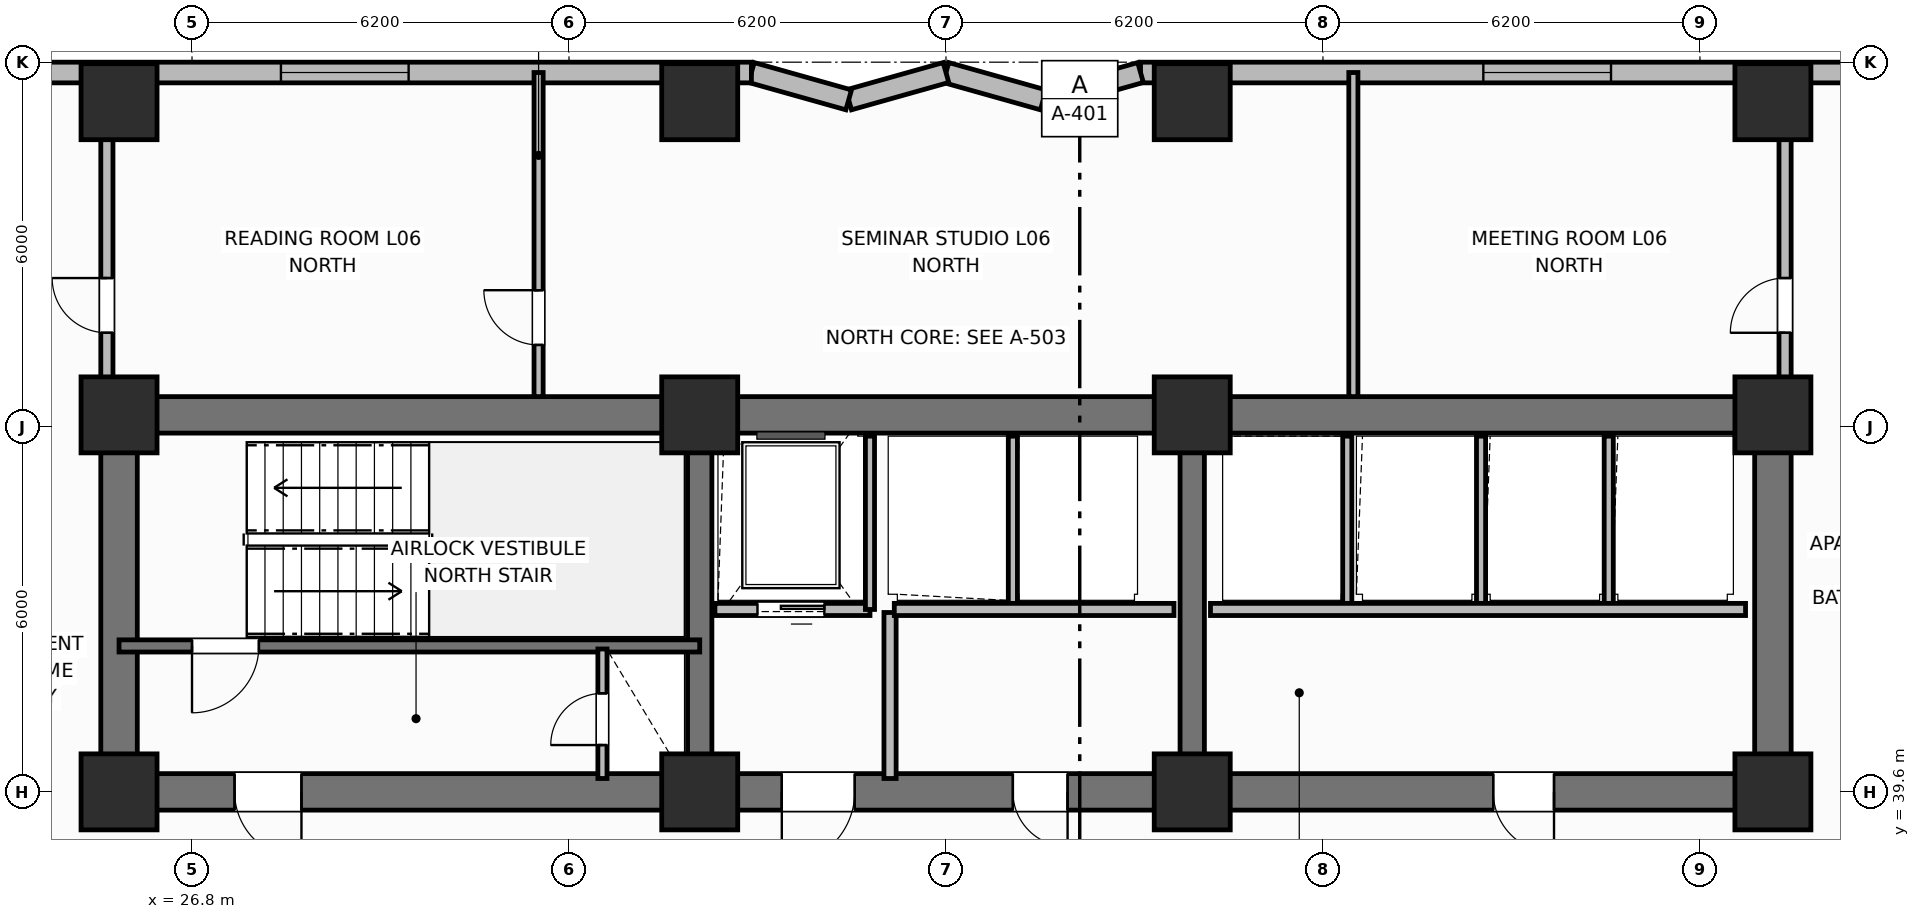
"""IFC4 building model, lengths in metres.
Left out: names, types, materials, properties, quantities, classifications, styles, units other than length and angle.
Written with IfcOpenShell. Run it as: python <this file> out.ifc"""

import sys

from ifc_helpers import new_model, si_unit, direction, frame, frame_2d, origin, origin_2d, place, context, subcontext, project, spatial, rectangle, extrude, element, fill, save


model = new_model("IFC4")
c1 = context("Model", 3, precision=1e-05, world=origin(), true_north=direction((0.0, 1.0)))
c2 = subcontext(c1, "Body", "Model", "MODEL_VIEW")
j1 = project(units=[si_unit("LENGTHUNIT", "METRE"), si_unit("PLANEANGLEUNIT", "RADIAN")], contexts=[c1])
p1 = place(None, origin())
s1 = spatial("IfcSite", under=j1, at=p1, CompositionType="ELEMENT")
p2 = place(p1, origin())
s2 = spatial("IfcBuilding", under=s1, at=p2, CompositionType="ELEMENT")
p3 = place(p2, frame((0.0, 0.0, 28.8)))
s3 = spatial("IfcBuildingStorey", under=s2, at=p3, CompositionType="ELEMENT", Elevation=28.8)
p4 = place(p3, frame((25.6, 45.8, 0.0), z_axis=(0.0, 0.0, 1.0), x_axis=(1.0, 0.0, 0.0)))
e1 = element("IfcWall", 1, at=p4, inside=s3, PredefinedType="SHEAR", context=c2, shape_type="SweptSolid", body=[
    extrude(rectangle(XDim=27.2, YDim=0.6, at=frame_2d((13.6, 0.0))), origin(), (0.0, 0.0, 1.0), 3.7),
])
for number, where, z_axis, x_axis in (
    (2, (25.6, 39.9, 0.0), (0.0, 0.0, 1.0), (0.0, 1.0, 0.0)),
    (3, (52.8, 39.9, 0.0), (0.0, 0.0, 1.0), (0.0, 1.0, 0.0)),
):
    element("IfcWall", number, at=place(p3, frame(where, z_axis=z_axis, x_axis=x_axis)), inside=s3, PredefinedType="SHEAR", context=c2, shape_type="SweptSolid", body=[
        extrude(rectangle(XDim=5.6, YDim=0.6, at=frame_2d((2.8, 0.0))), origin(), (0.0, 0.0, 1.0), 3.7),
    ])
p5 = place(p3, frame((52.8, 39.6, 0.0), z_axis=(0.0, 0.0, 1.0), x_axis=(-1.0, 0.0, 0.0)))
e4 = element("IfcWall", 4, at=p5, inside=s3, PredefinedType="SHEAR", context=c2, shape_type="SweptSolid", body=[
    extrude(rectangle(XDim=27.2, YDim=0.6, at=frame_2d((13.6, 0.0))), origin(), (0.0, 0.0, 1.0), 3.7),
])
p6 = place(p5, frame((24.2, 0.0, 0.0)))
e5 = element("IfcOpeningElement", 5, at=p6, cuts=e4, PredefinedType="OPENING", context=c2, shape_type="SweptSolid", body=[
    extrude(rectangle(XDim=1.1, YDim=2.15, at=frame_2d((0.55, 1.075))), frame((0.0, 0.31, 0.0), z_axis=(0.0, -1.0, 0.0), x_axis=(1.0, 0.0, 0.0)), (0.0, 0.0, 1.0), 0.62),
])
p7 = place(p5, frame((15.1, 0.0, 0.0)))
e6 = element("IfcOpeningElement", 6, at=p7, cuts=e4, PredefinedType="OPENING", context=c2, shape_type="SweptSolid", body=[
    extrude(rectangle(XDim=1.2, YDim=2.15, at=frame_2d((0.6, 1.075))), frame((0.0, 0.31, 0.0), z_axis=(0.0, -1.0, 0.0), x_axis=(1.0, 0.0, 0.0)), (0.0, 0.0, 1.0), 0.62),
])
p8 = place(p5, frame((11.6, 0.0, 0.0)))
e7 = element("IfcOpeningElement", 7, at=p8, cuts=e4, PredefinedType="OPENING", context=c2, shape_type="SweptSolid", body=[
    extrude(rectangle(XDim=0.9, YDim=2.1, at=frame_2d((0.45, 1.05))), frame((0.0, 0.31, 0.0), z_axis=(0.0, -1.0, 0.0), x_axis=(1.0, 0.0, 0.0)), (0.0, 0.0, 1.0), 0.62),
])
p9 = place(p5, frame((3.6, 0.0, 0.0)))
e8 = element("IfcOpeningElement", 8, at=p9, cuts=e4, PredefinedType="OPENING", context=c2, shape_type="SweptSolid", body=[
    extrude(rectangle(XDim=1.0, YDim=2.15, at=frame_2d((0.5, 1.075))), frame((0.0, 0.31, 0.0), z_axis=(0.0, -1.0, 0.0), x_axis=(1.0, 0.0, 0.0)), (0.0, 0.0, 1.0), 0.62),
])
for number, where, z_axis, x_axis in (
    (9, (35.15, 39.9, 0.0), (0.0, 0.0, 1.0), (0.0, 1.0, 0.0)),
    (10, (43.25, 39.9, 0.0), (0.0, 0.0, 1.0), (0.0, 1.0, 0.0)),
):
    element("IfcWall", number, at=place(p3, frame(where, z_axis=z_axis, x_axis=x_axis)), inside=s3, PredefinedType="SHEAR", context=c2, shape_type="SweptSolid", body=[
        extrude(rectangle(XDim=5.6, YDim=0.4, at=frame_2d((2.8, 0.0))), origin(), (0.0, 0.0, 1.0), 3.7),
    ])
for number, where, z_axis, x_axis in (
    (11, (25.6, 39.6, 0.0), (0.0, 0.0, 1.0), (1.0, 0.0, 0.0)),
    (12, (25.6, 45.8, 0.0), (0.0, 0.0, 1.0), (1.0, 0.0, 0.0)),
    (13, (35.15, 39.6, 0.0), (0.0, 0.0, 1.0), (1.0, 0.0, 0.0)),
    (14, (35.15, 45.8, 0.0), (0.0, 0.0, 1.0), (1.0, 0.0, 0.0)),
    (15, (43.25, 39.6, 0.0), (0.0, 0.0, 1.0), (1.0, 0.0, 0.0)),
    (16, (43.25, 45.8, 0.0), (0.0, 0.0, 1.0), (1.0, 0.0, 0.0)),
    (17, (52.8, 39.6, 0.0), (0.0, 0.0, 1.0), (1.0, 0.0, 0.0)),
    (18, (52.8, 45.8, 0.0), (0.0, 0.0, 1.0), (1.0, 0.0, 0.0)),
    (19, (25.6, 50.95, 0.0), (0.0, 0.0, 1.0), (1.0, 0.0, 0.0)),
    (20, (35.15, 50.95, 0.0), (0.0, 0.0, 1.0), (1.0, 0.0, 0.0)),
    (21, (43.25, 50.95, 0.0), (0.0, 0.0, 1.0), (1.0, 0.0, 0.0)),
    (22, (52.8, 50.95, 0.0), (0.0, 0.0, 1.0), (1.0, 0.0, 0.0)),
):
    element("IfcColumn", number, at=place(p3, frame(where, z_axis=z_axis, x_axis=x_axis)), inside=s3, PredefinedType="COLUMN", context=c2, shape_type="SweptSolid", body=[
        extrude(rectangle(XDim=1.25, YDim=1.25, at=origin_2d()), origin(), (0.0, 0.0, 1.0), 3.7),
    ])
p10 = place(p3, frame((59.8, 51.43, 0.0), z_axis=(0.0, 0.0, 1.0), x_axis=(-1.0, 0.0, 0.0)))
e23 = element("IfcWall", 23, at=p10, inside=s3, PredefinedType="SOLIDWALL", context=c2, shape_type="SweptSolid", body=[
    extrude(rectangle(XDim=17.4, YDim=0.34, at=frame_2d((8.7, 0.0))), origin(), (0.0, 0.0, 1.0), 2.7),
])
p11 = place(p10, frame((1.262, 0.0, 0.68)))
e24 = element("IfcOpeningElement", 24, at=p11, cuts=e23, PredefinedType="OPENING", context=c2, shape_type="SweptSolid", body=[
    extrude(rectangle(XDim=2.1, YDim=1.9, at=frame_2d((1.05, 0.95))), frame((0.0, 0.18, 0.0), z_axis=(0.0, -1.0, 0.0), x_axis=(1.0, 0.0, 0.0)), (0.0, 0.0, 1.0), 0.36),
])
p12 = place(p10, frame((9.663, 0.0, 0.68)))
e25 = element("IfcOpeningElement", 25, at=p12, cuts=e23, PredefinedType="OPENING", context=c2, shape_type="SweptSolid", body=[
    extrude(rectangle(XDim=2.1, YDim=1.9, at=frame_2d((1.05, 0.95))), frame((0.0, 0.18, 0.0), z_axis=(0.0, -1.0, 0.0), x_axis=(1.0, 0.0, 0.0)), (0.0, 0.0, 1.0), 0.36),
])
p13 = place(p3, frame((42.4, 51.43, 0.0), z_axis=(0.0, 0.0, 1.0), x_axis=(-0.962652136636, -0.270741322725, 0.0)))
e26 = element("IfcWall", 26, at=p13, inside=s3, PredefinedType="SOLIDWALL", context=c2, shape_type="SweptSolid", body=[
    extrude(rectangle(XDim=1.662, YDim=0.34, at=frame_2d((0.831, 0.0))), origin(), (0.0, 0.0, 1.0), 2.7),
])
p14 = place(p3, frame((40.8, 50.98, 0.0), z_axis=(0.0, 0.0, 1.0), x_axis=(-0.962662902433, 0.270703040766, 0.0)))
e27 = element("IfcWall", 27, at=p14, inside=s3, PredefinedType="SOLIDWALL", context=c2, shape_type="SweptSolid", body=[
    extrude(rectangle(XDim=1.662, YDim=0.34, at=frame_2d((0.831, 0.0))), origin(), (0.0, 0.0, 1.0), 2.7),
])
p15 = place(p3, frame((39.2, 51.43, 0.0), z_axis=(0.0, 0.0, 1.0), x_axis=(-0.962652136636, -0.270741322725, 0.0)))
e28 = element("IfcWall", 28, at=p15, inside=s3, PredefinedType="SOLIDWALL", context=c2, shape_type="SweptSolid", body=[
    extrude(rectangle(XDim=1.662, YDim=0.34, at=frame_2d((0.831, 0.0))), origin(), (0.0, 0.0, 1.0), 2.7),
])
p16 = place(p3, frame((37.6, 50.98, 0.0), z_axis=(0.0, 0.0, 1.0), x_axis=(-0.962662902433, 0.270703040766, 0.0)))
e29 = element("IfcWall", 29, at=p16, inside=s3, PredefinedType="SOLIDWALL", context=c2, shape_type="SweptSolid", body=[
    extrude(rectangle(XDim=1.662, YDim=0.34, at=frame_2d((0.831, 0.0))), origin(), (0.0, 0.0, 1.0), 2.7),
])
p17 = place(p3, frame((36.0, 51.43, 0.0), z_axis=(0.0, 0.0, 1.0), x_axis=(-1.0, 0.0, 0.0)))
e30 = element("IfcWall", 30, at=p17, inside=s3, PredefinedType="SOLIDWALL", context=c2, shape_type="SweptSolid", body=[
    extrude(rectangle(XDim=17.4, YDim=0.34, at=frame_2d((8.7, 0.0))), origin(), (0.0, 0.0, 1.0), 2.7),
])
p18 = place(p17, frame((5.637, 0.0, 0.68)))
e31 = element("IfcOpeningElement", 31, at=p18, cuts=e30, PredefinedType="OPENING", context=c2, shape_type="SweptSolid", body=[
    extrude(rectangle(XDim=2.1, YDim=1.9, at=frame_2d((1.05, 0.95))), frame((0.0, 0.18, 0.0), z_axis=(0.0, -1.0, 0.0), x_axis=(1.0, 0.0, 0.0)), (0.0, 0.0, 1.0), 0.36),
])
p19 = place(p17, frame((14.038, 0.0, 0.68)))
e32 = element("IfcOpeningElement", 32, at=p19, cuts=e30, PredefinedType="OPENING", context=c2, shape_type="SweptSolid", body=[
    extrude(rectangle(XDim=2.1, YDim=1.9, at=frame_2d((1.05, 0.95))), frame((0.0, 0.18, 0.0), z_axis=(0.0, -1.0, 0.0), x_axis=(1.0, 0.0, 0.0)), (0.0, 0.0, 1.0), 0.36),
])
p20 = place(p3, frame((35.15, 42.0, 0.0), z_axis=(0.0, 0.0, 1.0), x_axis=(-1.0, 0.0, 0.0)))
e33 = element("IfcWall", 33, at=p20, inside=s3, PredefinedType="SHEAR", context=c2, shape_type="SweptSolid", body=[
    extrude(rectangle(XDim=9.55, YDim=0.2, at=frame_2d((4.775, 0.0))), origin(), (0.0, 0.0, 1.0), 3.7),
])
p21 = place(p20, frame((7.25, 0.0, 0.0)))
e34 = element("IfcOpeningElement", 34, at=p21, cuts=e33, PredefinedType="OPENING", context=c2, shape_type="SweptSolid", body=[
    extrude(rectangle(XDim=1.1, YDim=2.15, at=frame_2d((0.55, 1.075))), frame((0.0, 0.11, 0.0), z_axis=(0.0, -1.0, 0.0), x_axis=(1.0, 0.0, 0.0)), (0.0, 0.0, 1.0), 0.22),
])
p22 = place(p3, frame((33.55, 39.82, 0.0), z_axis=(0.0, 0.0, 1.0), x_axis=(0.0, 1.0, 0.0)))
e35 = element("IfcWall", 35, at=p22, inside=s3, PredefinedType="PARTITIONING", context=c2, shape_type="SweptSolid", body=[
    extrude(rectangle(XDim=2.13, YDim=0.15, at=frame_2d((1.065, 0.0))), origin(), (0.0, 0.0, 1.0), 2.53),
])
p23 = place(p22, frame((0.55, 0.0, 0.0)))
e36 = element("IfcOpeningElement", 36, at=p23, cuts=e35, PredefinedType="OPENING", context=c2, shape_type="SweptSolid", body=[
    extrude(rectangle(XDim=0.85, YDim=2.05, at=frame_2d((0.425, 1.025))), frame((0.0, 0.085, 0.0), z_axis=(0.0, -1.0, 0.0), x_axis=(1.0, 0.0, 0.0)), (0.0, 0.0, 1.0), 0.17),
])
p24 = place(p3, frame((37.95, 42.6, 0.0), z_axis=(0.0, 0.0, 1.0), x_axis=(-1.0, 0.0, 0.0)))
e37 = element("IfcWall", 37, at=p24, inside=s3, PredefinedType="PARTITIONING", context=c2, shape_type="SweptSolid", body=[
    extrude(rectangle(XDim=2.55, YDim=0.2, at=frame_2d((1.275, 0.0))), origin(), (0.0, 0.0, 1.0), 2.3),
])
p25 = place(p24, frame((0.75, 0.0, 0.0)))
e38 = element("IfcOpeningElement", 38, at=p25, cuts=e37, PredefinedType="OPENING", context=c2, shape_type="SweptSolid", body=[
    extrude(rectangle(XDim=1.1, YDim=2.15, at=frame_2d((0.55, 1.075))), frame((0.0, 0.11, 0.0), z_axis=(0.0, -1.0, 0.0), x_axis=(1.0, 0.0, 0.0)), (0.0, 0.0, 1.0), 0.22),
])
p26 = place(p3, frame((37.95, 42.6, 0.0), z_axis=(0.0, 0.0, 1.0), x_axis=(0.0, 1.0, 0.0)))
e39 = element("IfcWall", 39, at=p26, inside=s3, PredefinedType="PARTITIONING", context=c2, shape_type="SweptSolid", body=[
    extrude(rectangle(XDim=2.85, YDim=0.15, at=frame_2d((1.425, 0.0))), origin(), (0.0, 0.0, 1.0), 2.53),
])
p27 = place(p3, frame((38.28, 39.82, 0.0), z_axis=(0.0, 0.0, 1.0), x_axis=(0.0, 1.0, 0.0)))
e40 = element("IfcWall", 40, at=p27, inside=s3, PredefinedType="PARTITIONING", context=c2, shape_type="SweptSolid", body=[
    extrude(rectangle(XDim=2.73, YDim=0.2, at=frame_2d((1.365, 0.0))), origin(), (0.0, 0.0, 1.0), 2.53),
])
p28 = place(p3, frame((40.3, 42.65, 0.0), z_axis=(0.0, 0.0, 1.0), x_axis=(0.0, 1.0, 0.0)))
e41 = element("IfcWall", 41, at=p28, inside=s3, PredefinedType="PARTITIONING", context=c2, shape_type="SweptSolid", body=[
    extrude(rectangle(XDim=2.8, YDim=0.15, at=frame_2d((1.4, 0.0))), origin(), (0.0, 0.0, 1.0), 2.53),
])
p29 = place(p3, frame((42.95, 42.6, 0.0), z_axis=(0.0, 0.0, 1.0), x_axis=(-1.0, 0.0, 0.0)))
e42 = element("IfcWall", 42, at=p29, inside=s3, PredefinedType="PARTITIONING", context=c2, shape_type="SweptSolid", body=[
    extrude(rectangle(XDim=4.6, YDim=0.2, at=frame_2d((2.3, 0.0))), origin(), (0.0, 0.0, 1.0), 2.3),
])
for number, where, z_axis, x_axis in (
    (43, (45.8, 42.65, 0.0), (0.0, 0.0, 1.0), (0.0, 1.0, 0.0)),
    (44, (48.0, 42.65, 0.0), (0.0, 0.0, 1.0), (0.0, 1.0, 0.0)),
    (45, (50.1, 42.65, 0.0), (0.0, 0.0, 1.0), (0.0, 1.0, 0.0)),
):
    element("IfcWall", number, at=place(p3, frame(where, z_axis=z_axis, x_axis=x_axis)), inside=s3, PredefinedType="PARTITIONING", context=c2, shape_type="SweptSolid", body=[
        extrude(rectangle(XDim=2.8, YDim=0.15, at=frame_2d((1.4, 0.0))), origin(), (0.0, 0.0, 1.0), 2.53),
    ])
p30 = place(p3, frame((52.35, 42.6, 0.0), z_axis=(0.0, 0.0, 1.0), x_axis=(-1.0, 0.0, 0.0)))
e46 = element("IfcWall", 46, at=p30, inside=s3, PredefinedType="PARTITIONING", context=c2, shape_type="SweptSolid", body=[
    extrude(rectangle(XDim=8.8, YDim=0.2, at=frame_2d((4.4, 0.0))), origin(), (0.0, 0.0, 1.0), 2.53),
])
p31 = place(p3, frame((32.5, 46.1, 0.0), z_axis=(0.0, 0.0, 1.0), x_axis=(0.0, 1.0, 0.0)))
e47 = element("IfcWall", 47, at=p31, inside=s3, PredefinedType="PARTITIONING", context=c2, shape_type="SweptSolid", body=[
    extrude(rectangle(XDim=5.33, YDim=0.15, at=frame_2d((2.665, 0.0))), origin(), (0.0, 0.0, 1.0), 2.53),
])
p32 = place(p31, frame((0.85, 0.0, 0.0)))
e48 = element("IfcOpeningElement", 48, at=p32, cuts=e47, PredefinedType="OPENING", context=c2, shape_type="SweptSolid", body=[
    extrude(rectangle(XDim=0.9, YDim=2.1, at=frame_2d((0.45, 1.05))), frame((0.0, 0.085, 0.0), z_axis=(0.0, -1.0, 0.0), x_axis=(1.0, 0.0, 0.0)), (0.0, 0.0, 1.0), 0.17),
])
p33 = place(p3, frame((45.9, 46.1, 0.0), z_axis=(0.0, 0.0, 1.0), x_axis=(0.0, 1.0, 0.0)))
e49 = element("IfcWall", 49, at=p33, inside=s3, PredefinedType="PARTITIONING", context=c2, shape_type="SweptSolid", body=[
    extrude(rectangle(XDim=5.33, YDim=0.15, at=frame_2d((2.665, 0.0))), origin(), (0.0, 0.0, 1.0), 2.53),
])
p34 = place(p3, frame((25.4, 46.1, 0.0), z_axis=(0.0, 0.0, 1.0), x_axis=(0.0, 1.0, 0.0)))
e50 = element("IfcWall", 50, at=p34, inside=s3, PredefinedType="PARTITIONING", context=c2, shape_type="SweptSolid", body=[
    extrude(rectangle(XDim=4.73, YDim=0.2, at=frame_2d((2.365, 0.0))), origin(), (0.0, 0.0, 1.0), 2.53),
])
p35 = place(p34, frame((1.05, 0.0, 0.0)))
e51 = element("IfcOpeningElement", 51, at=p35, cuts=e50, PredefinedType="OPENING", context=c2, shape_type="SweptSolid", body=[
    extrude(rectangle(XDim=0.9, YDim=2.1, at=frame_2d((0.45, 1.05))), frame((0.0, 0.11, 0.0), z_axis=(0.0, -1.0, 0.0), x_axis=(1.0, 0.0, 0.0)), (0.0, 0.0, 1.0), 0.22),
])
p36 = place(p3, frame((53.0, 46.1, 0.0), z_axis=(0.0, 0.0, 1.0), x_axis=(0.0, 1.0, 0.0)))
e52 = element("IfcWall", 52, at=p36, inside=s3, PredefinedType="PARTITIONING", context=c2, shape_type="SweptSolid", body=[
    extrude(rectangle(XDim=4.73, YDim=0.2, at=frame_2d((2.365, 0.0))), origin(), (0.0, 0.0, 1.0), 2.53),
])
p37 = place(p36, frame((1.05, 0.0, 0.0)))
e53 = element("IfcOpeningElement", 53, at=p37, cuts=e52, PredefinedType="OPENING", context=c2, shape_type="SweptSolid", body=[
    extrude(rectangle(XDim=0.9, YDim=2.1, at=frame_2d((0.45, 1.05))), frame((0.0, 0.11, 0.0), z_axis=(0.0, -1.0, 0.0), x_axis=(1.0, 0.0, 0.0)), (0.0, 0.0, 1.0), 0.22),
])
p38 = place(p12, origin())
e54 = element("IfcWindow", 54, at=p38, inside=s3, PartitioningType="SINGLE_PANEL", PredefinedType="WINDOW", context=c2, shape_type="SweptSolid", body=[
    extrude(rectangle(XDim=2.1, YDim=1.9, at=frame_2d((1.05, 0.95))), frame((0.0, 0.03, 0.0), z_axis=(0.0, -1.0, 0.0), x_axis=(1.0, 0.0, 0.0)), (0.0, 0.0, 1.0), 0.06),
])
fill(e25, e54)
p39 = place(p18, origin())
e55 = element("IfcWindow", 55, at=p39, inside=s3, PartitioningType="SINGLE_PANEL", PredefinedType="WINDOW", context=c2, shape_type="SweptSolid", body=[
    extrude(rectangle(XDim=2.1, YDim=1.9, at=frame_2d((1.05, 0.95))), frame((0.0, 0.03, 0.0), z_axis=(0.0, -1.0, 0.0), x_axis=(1.0, 0.0, 0.0)), (0.0, 0.0, 1.0), 0.06),
])
fill(e31, e55)
p40 = place(p21, origin())
e56 = element("IfcDoor", 56, at=p40, inside=s3, OperationType="SINGLE_SWING_RIGHT", PredefinedType="DOOR", context=c2, shape_type="SweptSolid", body=[
    extrude(rectangle(XDim=1.1, YDim=2.15, at=frame_2d((0.55, 1.075))), frame((0.0, 0.025, 0.0), z_axis=(0.0, -1.0, 0.0), x_axis=(1.0, 0.0, 0.0)), (0.0, 0.0, 1.0), 0.05),
])
fill(e34, e56)
p41 = place(p23, origin())
e57 = element("IfcDoor", 57, at=p41, inside=s3, OperationType="SINGLE_SWING_LEFT", PredefinedType="TRAPDOOR", context=c2, shape_type="SweptSolid", body=[
    extrude(rectangle(XDim=0.85, YDim=2.05, at=frame_2d((0.425, 1.025))), frame((0.0, 0.025, 0.0), z_axis=(0.0, -1.0, 0.0), x_axis=(1.0, 0.0, 0.0)), (0.0, 0.0, 1.0), 0.05),
])
fill(e36, e57)
p42 = place(p25, origin())
e58 = element("IfcDoor", 58, at=p42, inside=s3, OperationType="SLIDING_TO_LEFT", PredefinedType="DOOR", context=c2, shape_type="SweptSolid", body=[
    extrude(rectangle(XDim=1.1, YDim=2.15, at=frame_2d((0.55, 1.075))), frame((0.0, 0.025, 0.0), z_axis=(0.0, -1.0, 0.0), x_axis=(1.0, 0.0, 0.0)), (0.0, 0.0, 1.0), 0.05),
])
fill(e38, e58)
p43 = place(p32, origin())
e59 = element("IfcDoor", 59, at=p43, inside=s3, OperationType="SINGLE_SWING_RIGHT", PredefinedType="DOOR", context=c2, shape_type="SweptSolid", body=[
    extrude(rectangle(XDim=0.9, YDim=2.1, at=frame_2d((0.45, 1.05))), frame((0.0, 0.025, 0.0), z_axis=(0.0, -1.0, 0.0), x_axis=(1.0, 0.0, 0.0)), (0.0, 0.0, 1.0), 0.05),
])
fill(e48, e59)
p44 = place(p35, origin())
e60 = element("IfcDoor", 60, at=p44, inside=s3, OperationType="SINGLE_SWING_RIGHT", PredefinedType="DOOR", context=c2, shape_type="SweptSolid", body=[
    extrude(rectangle(XDim=0.9, YDim=2.1, at=frame_2d((0.45, 1.05))), frame((0.0, 0.025, 0.0), z_axis=(0.0, -1.0, 0.0), x_axis=(1.0, 0.0, 0.0)), (0.0, 0.0, 1.0), 0.05),
])
fill(e51, e60)
p45 = place(p37, origin())
e61 = element("IfcDoor", 61, at=p45, inside=s3, OperationType="SINGLE_SWING_LEFT", PredefinedType="DOOR", context=c2, shape_type="SweptSolid", body=[
    extrude(rectangle(XDim=0.9, YDim=2.1, at=frame_2d((0.45, 1.05))), frame((0.0, 0.025, 0.0), z_axis=(0.0, -1.0, 0.0), x_axis=(1.0, 0.0, 0.0)), (0.0, 0.0, 1.0), 0.05),
])
fill(e53, e61)
p46 = place(p6, origin())
e62 = element("IfcDoor", 62, at=p46, inside=s3, OperationType="SINGLE_SWING_LEFT", PredefinedType="DOOR", context=c2, shape_type="SweptSolid", body=[
    extrude(rectangle(XDim=1.1, YDim=2.15, at=frame_2d((0.55, 1.075))), frame((0.0, 0.025, 0.0), z_axis=(0.0, -1.0, 0.0), x_axis=(1.0, 0.0, 0.0)), (0.0, 0.0, 1.0), 0.05),
])
fill(e5, e62)
p47 = place(p7, origin())
e63 = element("IfcDoor", 63, at=p47, inside=s3, OperationType="SINGLE_SWING_RIGHT", PredefinedType="DOOR", context=c2, shape_type="SweptSolid", body=[
    extrude(rectangle(XDim=1.2, YDim=2.15, at=frame_2d((0.6, 1.075))), frame((0.0, 0.025, 0.0), z_axis=(0.0, -1.0, 0.0), x_axis=(1.0, 0.0, 0.0)), (0.0, 0.0, 1.0), 0.05),
])
fill(e6, e63)
p48 = place(p8, origin())
e64 = element("IfcDoor", 64, at=p48, inside=s3, OperationType="SINGLE_SWING_LEFT", PredefinedType="DOOR", context=c2, shape_type="SweptSolid", body=[
    extrude(rectangle(XDim=0.9, YDim=2.1, at=frame_2d((0.45, 1.05))), frame((0.0, 0.025, 0.0), z_axis=(0.0, -1.0, 0.0), x_axis=(1.0, 0.0, 0.0)), (0.0, 0.0, 1.0), 0.05),
])
fill(e7, e64)
p49 = place(p9, origin())
e65 = element("IfcDoor", 65, at=p49, inside=s3, OperationType="SINGLE_SWING_LEFT", PredefinedType="DOOR", context=c2, shape_type="SweptSolid", body=[
    extrude(rectangle(XDim=1.0, YDim=2.15, at=frame_2d((0.5, 1.075))), frame((0.0, 0.025, 0.0), z_axis=(0.0, -1.0, 0.0), x_axis=(1.0, 0.0, 0.0)), (0.0, 0.0, 1.0), 0.05),
])
fill(e8, e65)
save(model, sys.argv[1])
